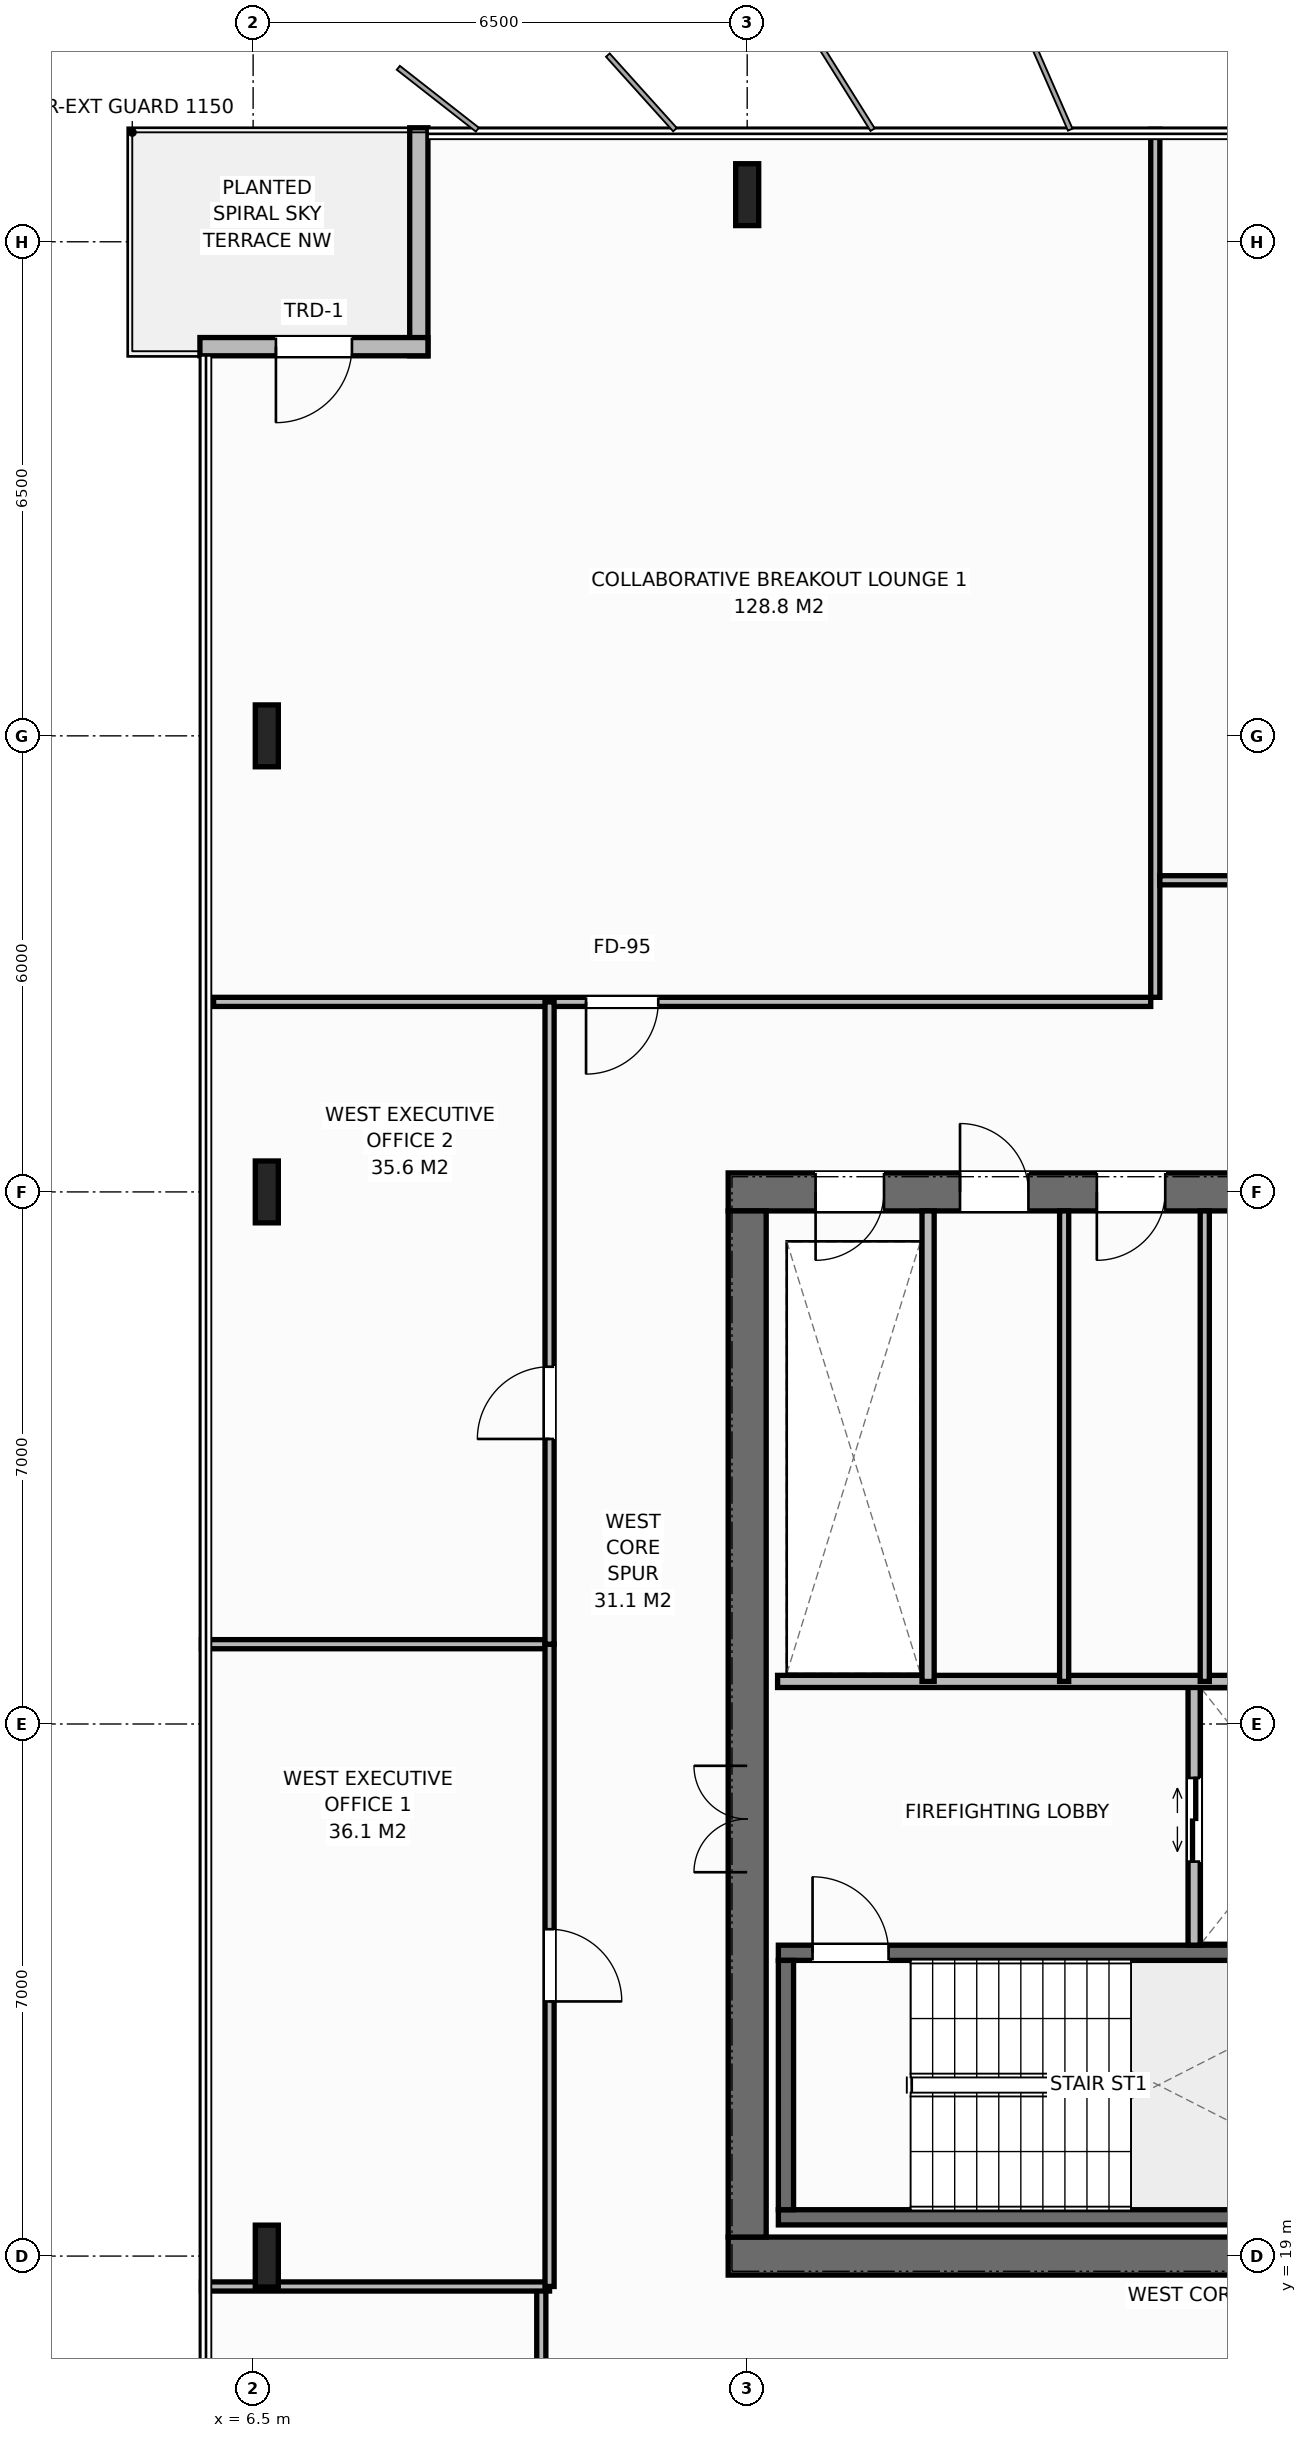
"""IFC4 building model, lengths in metres.
Left out: names, types, materials, properties, quantities, classifications, styles, units other than length and angle.
Written with IfcOpenShell. Run it as: python <this file> out.ifc"""

import sys

from ifc_helpers import new_model, si_unit, direction, frame, frame_2d, origin, origin_2d, place, context, subcontext, project, spatial, rectangle, i_section, extrude, element, fill, save


model = new_model("IFC4")
c1 = context("Model", 3, precision=1e-05, world=origin(), true_north=direction((0.0, 1.0)))
c2 = subcontext(c1, "Body", "Model", "MODEL_VIEW")
j1 = project(units=[si_unit("LENGTHUNIT", "METRE"), si_unit("PLANEANGLEUNIT", "RADIAN")], contexts=[c1])
p1 = place(None, origin())
s1 = spatial("IfcSite", under=j1, at=p1, CompositionType="ELEMENT")
p2 = place(p1, origin())
s2 = spatial("IfcBuilding", under=s1, at=p2, CompositionType="ELEMENT")
p3 = place(p2, frame((0.0, 0.0, 221.4)))
s3 = spatial("IfcBuildingStorey", under=s2, at=p3, CompositionType="ELEMENT", Elevation=221.4)
p4 = place(p3, frame((12.75, 19.0, 0.0), z_axis=(0.0, 0.0, 1.0), x_axis=(1.0, 0.0, 0.0)))
e1 = element("IfcWall", 1, at=p4, inside=s3, PredefinedType="SHEAR", context=c2, shape_type="SweptSolid", body=[
    extrude(rectangle(XDim=13.5, YDim=0.5, at=frame_2d((6.75, 0.0))), origin(), (0.0, 0.0, 1.0), 3.8),
])
p5 = place(p4, frame((9.13, 0.0, 0.0)))
e2 = element("IfcOpeningElement", 2, at=p5, cuts=e1, PredefinedType="OPENING", context=c2, shape_type="SweptSolid", body=[
    extrude(rectangle(XDim=1.4, YDim=2.2, at=frame_2d((0.7, 1.1))), frame((0.0, 0.26, 0.0), z_axis=(0.0, -1.0, 0.0), x_axis=(1.0, 0.0, 0.0)), (0.0, 0.0, 1.0), 0.52),
])
p6 = place(p3, frame((12.75, 33.0, 0.0), z_axis=(0.0, 0.0, 1.0), x_axis=(1.0, 0.0, 0.0)))
e3 = element("IfcWall", 3, at=p6, inside=s3, PredefinedType="SHEAR", context=c2, shape_type="SweptSolid", body=[
    extrude(rectangle(XDim=13.5, YDim=0.5, at=frame_2d((6.75, 0.0))), origin(), (0.0, 0.0, 1.0), 3.8),
])
p7 = place(p6, frame((1.15, 0.0, 0.0)))
e4 = element("IfcOpeningElement", 4, at=p7, cuts=e3, PredefinedType="OPENING", context=c2, shape_type="SweptSolid", body=[
    extrude(rectangle(XDim=0.9, YDim=2.15, at=frame_2d((0.45, 1.075))), frame((0.0, 0.26, 0.0), z_axis=(0.0, -1.0, 0.0), x_axis=(1.0, 0.0, 0.0)), (0.0, 0.0, 1.0), 0.52),
])
p8 = place(p6, frame((3.05, 0.0, 0.0)))
e5 = element("IfcOpeningElement", 5, at=p8, cuts=e3, PredefinedType="OPENING", context=c2, shape_type="SweptSolid", body=[
    extrude(rectangle(XDim=0.9, YDim=2.15, at=frame_2d((0.45, 1.075))), frame((0.0, 0.26, 0.0), z_axis=(0.0, -1.0, 0.0), x_axis=(1.0, 0.0, 0.0)), (0.0, 0.0, 1.0), 0.52),
])
p9 = place(p6, frame((4.85, 0.0, 0.0)))
e6 = element("IfcOpeningElement", 6, at=p9, cuts=e3, PredefinedType="OPENING", context=c2, shape_type="SweptSolid", body=[
    extrude(rectangle(XDim=0.9, YDim=2.15, at=frame_2d((0.45, 1.075))), frame((0.0, 0.26, 0.0), z_axis=(0.0, -1.0, 0.0), x_axis=(1.0, 0.0, 0.0)), (0.0, 0.0, 1.0), 0.52),
])
p10 = place(p6, frame((6.75, 0.0, 0.0)))
e7 = element("IfcOpeningElement", 7, at=p10, cuts=e3, PredefinedType="OPENING", context=c2, shape_type="SweptSolid", body=[
    extrude(rectangle(XDim=0.9, YDim=2.15, at=frame_2d((0.45, 1.075))), frame((0.0, 0.26, 0.0), z_axis=(0.0, -1.0, 0.0), x_axis=(1.0, 0.0, 0.0)), (0.0, 0.0, 1.0), 0.52),
])
p11 = place(p6, frame((9.13, 0.0, 0.0)))
e8 = element("IfcOpeningElement", 8, at=p11, cuts=e3, PredefinedType="OPENING", context=c2, shape_type="SweptSolid", body=[
    extrude(rectangle(XDim=1.4, YDim=2.2, at=frame_2d((0.7, 1.1))), frame((0.0, 0.26, 0.0), z_axis=(0.0, -1.0, 0.0), x_axis=(1.0, 0.0, 0.0)), (0.0, 0.0, 1.0), 0.52),
])
p12 = place(p3, frame((13.0, 19.25, 0.0), z_axis=(0.0, 0.0, 1.0), x_axis=(0.0, 1.0, 0.0)))
e9 = element("IfcWall", 9, at=p12, inside=s3, PredefinedType="SHEAR", context=c2, shape_type="SweptSolid", body=[
    extrude(rectangle(XDim=13.5, YDim=0.5, at=frame_2d((6.75, 0.0))), origin(), (0.0, 0.0, 1.0), 3.8),
])
p13 = place(p12, frame((4.8, 0.0, 0.0)))
e10 = element("IfcOpeningElement", 10, at=p13, cuts=e9, PredefinedType="OPENING", context=c2, shape_type="SweptSolid", body=[
    extrude(rectangle(XDim=1.4, YDim=2.2, at=frame_2d((0.7, 1.1))), frame((0.0, 0.26, 0.0), z_axis=(0.0, -1.0, 0.0), x_axis=(1.0, 0.0, 0.0)), (0.0, 0.0, 1.0), 0.52),
])
p14 = place(p3, frame((13.41, 19.51, 0.0), z_axis=(0.0, 0.0, 1.0), x_axis=(1.0, 0.0, 0.0)))
e11 = element("IfcWall", 11, at=p14, inside=s3, PredefinedType="SHEAR", context=c2, shape_type="SweptSolid", body=[
    extrude(rectangle(XDim=8.43, YDim=0.2, at=frame_2d((4.215, 0.0))), origin(), (0.0, 0.0, 1.0), 3.8),
])
p15 = place(p3, frame((13.41, 22.99, 0.0), z_axis=(0.0, 0.0, 1.0), x_axis=(1.0, 0.0, 0.0)))
e12 = element("IfcWall", 12, at=p15, inside=s3, PredefinedType="SHEAR", context=c2, shape_type="SweptSolid", body=[
    extrude(rectangle(XDim=8.43, YDim=0.2, at=frame_2d((4.215, 0.0))), origin(), (0.0, 0.0, 1.0), 3.8),
])
p16 = place(p15, frame((0.45, 0.0, 0.0)))
e13 = element("IfcOpeningElement", 13, at=p16, cuts=e12, PredefinedType="OPENING", context=c2, shape_type="SweptSolid", body=[
    extrude(rectangle(XDim=1.0, YDim=2.15, at=frame_2d((0.5, 1.075))), frame((0.0, 0.11, 0.0), z_axis=(0.0, -1.0, 0.0), x_axis=(1.0, 0.0, 0.0)), (0.0, 0.0, 1.0), 0.22),
])
p17 = place(p3, frame((13.51, 19.61, 0.0), z_axis=(0.0, 0.0, 1.0), x_axis=(0.0, 1.0, 0.0)))
e14 = element("IfcWall", 14, at=p17, inside=s3, PredefinedType="SHEAR", context=c2, shape_type="SweptSolid", body=[
    extrude(rectangle(XDim=3.28, YDim=0.2, at=frame_2d((1.64, 0.0))), origin(), (0.0, 0.0, 1.0), 3.8),
])
for number, where, z_axis, x_axis in (
    (15, (13.0, 46.12, 0.0), (0.0, 0.0, 1.0), (1.0, 0.0, 0.0)),
    (16, (6.68, 19.0, 0.0), (0.0, 0.0, 1.0), (1.0, 0.0, 0.0)),
    (17, (6.68, 33.0, 0.0), (0.0, 0.0, 1.0), (1.0, 0.0, 0.0)),
    (18, (6.68, 39.0, 0.0), (0.0, 0.0, 1.0), (1.0, 0.0, 0.0)),
):
    element("IfcColumn", number, at=place(p3, frame(where, z_axis=z_axis, x_axis=x_axis)), inside=s3, PredefinedType="COLUMN", context=c2, shape_type="SweptSolid", body=[
        extrude(i_section(OverallWidth=0.303, OverallDepth=0.814, WebThickness=0.021, FlangeThickness=0.04, at=origin_2d()), origin(), (0.0, 0.0, 1.0), 3.8),
    ])
p18 = place(p3, frame((8.68, 44.0, 0.0), z_axis=(0.0, 0.0, 1.0), x_axis=(0.0, 1.0, 0.0)))
e19 = element("IfcWall", 19, at=p18, inside=s3, PredefinedType="STANDARD", context=c2, shape_type="SweptSolid", body=[
    extrude(rectangle(XDim=3.0, YDim=0.24, at=frame_2d((1.5, 0.0))), origin(), (0.0, 0.0, 1.0), 3.58),
])
p19 = place(p3, frame((5.8, 44.12, 0.0), z_axis=(0.0, 0.0, 1.0), x_axis=(1.0, 0.0, 0.0)))
e20 = element("IfcWall", 20, at=p19, inside=s3, PredefinedType="STANDARD", context=c2, shape_type="SweptSolid", body=[
    extrude(rectangle(XDim=3.0, YDim=0.24, at=frame_2d((1.5, 0.0))), origin(), (0.0, 0.0, 1.0), 3.58),
])
p20 = place(p19, frame((1.0, 0.0, 0.0)))
e21 = element("IfcOpeningElement", 21, at=p20, cuts=e20, PredefinedType="OPENING", context=c2, shape_type="SweptSolid", body=[
    extrude(rectangle(XDim=1.0, YDim=2.2, at=frame_2d((0.5, 1.1))), frame((0.0, 0.13, 0.0), z_axis=(0.0, -1.0, 0.0), x_axis=(1.0, 0.0, 0.0)), (0.0, 0.0, 1.0), 0.26),
])
p21 = place(p3, frame((18.88, 23.09, 0.0), z_axis=(0.0, 0.0, 1.0), x_axis=(0.0, 1.0, 0.0)))
e22 = element("IfcWall", 22, at=p21, inside=s3, PredefinedType="STANDARD", context=c2, shape_type="SweptSolid", body=[
    extrude(rectangle(XDim=3.47, YDim=0.16, at=frame_2d((1.735, 0.0))), origin(), (0.0, 0.0, 1.0), 3.58),
])
p22 = place(p21, frame((1.1, 0.0, 0.0)))
e23 = element("IfcOpeningElement", 23, at=p22, cuts=e22, PredefinedType="OPENING", context=c2, shape_type="SweptSolid", body=[
    extrude(rectangle(XDim=1.1, YDim=2.2, at=frame_2d((0.55, 1.1))), frame((0.0, 0.09, 0.0), z_axis=(0.0, -1.0, 0.0), x_axis=(1.0, 0.0, 0.0)), (0.0, 0.0, 1.0), 0.18),
])
p23 = place(p3, frame((13.4, 26.56, 0.0), z_axis=(0.0, 0.0, 1.0), x_axis=(1.0, 0.0, 0.0)))
e24 = element("IfcWall", 24, at=p23, inside=s3, PredefinedType="STANDARD", context=c2, shape_type="SweptSolid", body=[
    extrude(rectangle(XDim=8.34, YDim=0.16, at=frame_2d((4.17, 0.0))), origin(), (0.0, 0.0, 1.0), 3.58),
])
p24 = place(p3, frame((15.38, 26.56, 0.0), z_axis=(0.0, 0.0, 1.0), x_axis=(0.0, 1.0, 0.0)))
e25 = element("IfcWall", 25, at=p24, inside=s3, PredefinedType="STANDARD", context=c2, shape_type="SweptSolid", body=[
    extrude(rectangle(XDim=6.19, YDim=0.16, at=frame_2d((3.095, 0.0))), origin(), (0.0, 0.0, 1.0), 3.58),
])
for number, where, z_axis, x_axis in (
    (26, (17.17, 26.56, 0.0), (0.0, 0.0, 1.0), (0.0, 1.0, 0.0)),
    (27, (19.02, 26.56, 0.0), (0.0, 0.0, 1.0), (0.0, 1.0, 0.0)),
):
    element("IfcWall", number, at=place(p3, frame(where, z_axis=z_axis, x_axis=x_axis)), inside=s3, PredefinedType="PARTITIONING", context=c2, shape_type="SweptSolid", body=[
        extrude(rectangle(XDim=6.19, YDim=0.12, at=frame_2d((3.095, 0.0))), origin(), (0.0, 0.0, 1.0), 3.58),
    ])
p25 = place(p3, frame((10.291, 16.5, 0.0), z_axis=(0.0, 0.0, 1.0), x_axis=(0.0, 1.0, 0.0)))
e28 = element("IfcWall", 28, at=p25, inside=s3, PredefinedType="PARTITIONING", context=c2, shape_type="SweptSolid", body=[
    extrude(rectangle(XDim=2.1, YDim=0.12, at=frame_2d((1.05, 0.0))), origin(), (0.0, 0.0, 1.0), 3.58),
])
p26 = place(p3, frame((18.369, 35.56, 0.0), z_axis=(0.0, 0.0, 1.0), x_axis=(0.0, 1.0, 0.0)))
e29 = element("IfcWall", 29, at=p26, inside=s3, PredefinedType="PARTITIONING", context=c2, shape_type="SweptSolid", body=[
    extrude(rectangle(XDim=11.42, YDim=0.12, at=frame_2d((5.71, 0.0))), origin(), (0.0, 0.0, 1.0), 3.58),
])
p27 = place(p3, frame((5.98, 35.5, 0.0), z_axis=(0.0, 0.0, 1.0), x_axis=(1.0, 0.0, 0.0)))
e30 = element("IfcWall", 30, at=p27, inside=s3, PredefinedType="PARTITIONING", context=c2, shape_type="SweptSolid", body=[
    extrude(rectangle(XDim=12.329, YDim=0.12, at=frame_2d((6.165, 0.0))), origin(), (0.0, 0.0, 1.0), 3.58),
])
p28 = place(p27, frame((4.9, 0.0, 0.0)))
e31 = element("IfcOpeningElement", 31, at=p28, cuts=e30, PredefinedType="OPENING", context=c2, shape_type="SweptSolid", body=[
    extrude(rectangle(XDim=0.95, YDim=2.15, at=frame_2d((0.475, 1.075))), frame((0.0, 0.07, 0.0), z_axis=(0.0, -1.0, 0.0), x_axis=(1.0, 0.0, 0.0)), (0.0, 0.0, 1.0), 0.14),
])
p29 = place(p3, frame((18.429, 37.1, 0.0), z_axis=(0.0, 0.0, 1.0), x_axis=(1.0, 0.0, 0.0)))
e32 = element("IfcWall", 32, at=p29, inside=s3, PredefinedType="PARTITIONING", context=c2, shape_type="SweptSolid", body=[
    extrude(rectangle(XDim=8.954, YDim=0.12, at=frame_2d((4.477, 0.0))), origin(), (0.0, 0.0, 1.0), 3.58),
])
p30 = place(p29, frame((4.002, 0.0, 0.0)))
e33 = element("IfcOpeningElement", 33, at=p30, cuts=e32, PredefinedType="OPENING", context=c2, shape_type="SweptSolid", body=[
    extrude(rectangle(XDim=0.95, YDim=2.15, at=frame_2d((0.475, 1.075))), frame((0.0, 0.07, 0.0), z_axis=(0.0, -1.0, 0.0), x_axis=(1.0, 0.0, 0.0)), (0.0, 0.0, 1.0), 0.14),
])
for number, where, z_axis, x_axis in (
    (34, (5.82, 18.6, 0.0), (0.0, 0.0, 1.0), (1.0, 0.0, 0.0)),
    (35, (5.82, 27.05, 0.0), (0.0, 0.0, 1.0), (1.0, 0.0, 0.0)),
):
    element("IfcWall", number, at=place(p3, frame(where, z_axis=z_axis, x_axis=x_axis)), inside=s3, PredefinedType="PARTITIONING", context=c2, shape_type="SweptSolid", body=[
        extrude(rectangle(XDim=4.58, YDim=0.12, at=frame_2d((2.29, 0.0))), origin(), (0.0, 0.0, 1.0), 3.58),
    ])
p31 = place(p3, frame((10.4, 18.6, 0.0), z_axis=(0.0, 0.0, 1.0), x_axis=(0.0, 1.0, 0.0)))
e36 = element("IfcWall", 36, at=p31, inside=s3, PredefinedType="PARTITIONING", context=c2, shape_type="SweptSolid", body=[
    extrude(rectangle(XDim=8.45, YDim=0.12, at=frame_2d((4.225, 0.0))), origin(), (0.0, 0.0, 1.0), 3.58),
])
p32 = place(p31, frame((3.75, 0.0, 0.0)))
e37 = element("IfcOpeningElement", 37, at=p32, cuts=e36, PredefinedType="OPENING", context=c2, shape_type="SweptSolid", body=[
    extrude(rectangle(XDim=0.95, YDim=2.15, at=frame_2d((0.475, 1.075))), frame((0.0, 0.07, 0.0), z_axis=(0.0, -1.0, 0.0), x_axis=(1.0, 0.0, 0.0)), (0.0, 0.0, 1.0), 0.14),
])
p33 = place(p3, frame((10.4, 27.05, 0.0), z_axis=(0.0, 0.0, 1.0), x_axis=(0.0, 1.0, 0.0)))
e38 = element("IfcWall", 38, at=p33, inside=s3, PredefinedType="PARTITIONING", context=c2, shape_type="SweptSolid", body=[
    extrude(rectangle(XDim=8.45, YDim=0.12, at=frame_2d((4.225, 0.0))), origin(), (0.0, 0.0, 1.0), 3.58),
])
p34 = place(p33, frame((2.7, 0.0, 0.0)))
e39 = element("IfcOpeningElement", 39, at=p34, cuts=e38, PredefinedType="OPENING", context=c2, shape_type="SweptSolid", body=[
    extrude(rectangle(XDim=0.95, YDim=2.15, at=frame_2d((0.475, 1.075))), frame((0.0, 0.07, 0.0), z_axis=(0.0, -1.0, 0.0), x_axis=(1.0, 0.0, 0.0)), (0.0, 0.0, 1.0), 0.14),
])
p35 = place(p20, origin())
e40 = element("IfcDoor", 40, at=p35, inside=s3, OperationType="SINGLE_SWING_RIGHT", PredefinedType="DOOR", context=c2, shape_type="SweptSolid", body=[
    extrude(rectangle(XDim=1.0, YDim=2.2, at=frame_2d((0.5, 1.1))), frame((0.0, 0.025, 0.0), z_axis=(0.0, -1.0, 0.0), x_axis=(1.0, 0.0, 0.0)), (0.0, 0.0, 1.0), 0.05),
])
fill(e21, e40)
p36 = place(p16, origin())
e41 = element("IfcDoor", 41, at=p36, inside=s3, OperationType="SINGLE_SWING_LEFT", PredefinedType="DOOR", context=c2, shape_type="SweptSolid", body=[
    extrude(rectangle(XDim=1.0, YDim=2.15, at=frame_2d((0.5, 1.075))), frame((0.0, 0.025, 0.0), z_axis=(0.0, -1.0, 0.0), x_axis=(1.0, 0.0, 0.0)), (0.0, 0.0, 1.0), 0.05),
])
fill(e13, e41)
p37 = place(p13, origin())
e42 = element("IfcDoor", 42, at=p37, inside=s3, OperationType="DOUBLE_DOOR_SINGLE_SWING", PredefinedType="DOOR", context=c2, shape_type="SweptSolid", body=[
    extrude(rectangle(XDim=1.4, YDim=2.2, at=frame_2d((0.7, 1.1))), frame((0.0, 0.025, 0.0), z_axis=(0.0, -1.0, 0.0), x_axis=(1.0, 0.0, 0.0)), (0.0, 0.0, 1.0), 0.05),
])
fill(e10, e42)
p38 = place(p22, origin())
e43 = element("IfcDoor", 43, at=p38, inside=s3, OperationType="DOUBLE_DOOR_SLIDING", PredefinedType="DOOR", context=c2, shape_type="SweptSolid", body=[
    extrude(rectangle(XDim=1.1, YDim=2.2, at=frame_2d((0.55, 1.1))), frame((0.0, 0.025, 0.0), z_axis=(0.0, -1.0, 0.0), x_axis=(1.0, 0.0, 0.0)), (0.0, 0.0, 1.0), 0.05),
])
fill(e23, e43)
p39 = place(p7, origin())
e44 = element("IfcDoor", 44, at=p39, inside=s3, OperationType="SINGLE_SWING_RIGHT", PredefinedType="DOOR", context=c2, shape_type="SweptSolid", body=[
    extrude(rectangle(XDim=0.9, YDim=2.15, at=frame_2d((0.45, 1.075))), frame((0.0, -0.025, 0.0), z_axis=(0.0, -1.0, 0.0), x_axis=(1.0, 0.0, 0.0)), (0.0, 0.0, 1.0), 0.05),
])
fill(e4, e44)
p40 = place(p8, origin())
e45 = element("IfcDoor", 45, at=p40, inside=s3, OperationType="SINGLE_SWING_LEFT", PredefinedType="DOOR", context=c2, shape_type="SweptSolid", body=[
    extrude(rectangle(XDim=0.9, YDim=2.15, at=frame_2d((0.45, 1.075))), frame((0.0, -0.025, 0.0), z_axis=(0.0, -1.0, 0.0), x_axis=(1.0, 0.0, 0.0)), (0.0, 0.0, 1.0), 0.05),
])
fill(e5, e45)
p41 = place(p9, origin())
e46 = element("IfcDoor", 46, at=p41, inside=s3, OperationType="SINGLE_SWING_RIGHT", PredefinedType="DOOR", context=c2, shape_type="SweptSolid", body=[
    extrude(rectangle(XDim=0.9, YDim=2.15, at=frame_2d((0.45, 1.075))), frame((0.0, -0.025, 0.0), z_axis=(0.0, -1.0, 0.0), x_axis=(1.0, 0.0, 0.0)), (0.0, 0.0, 1.0), 0.05),
])
fill(e6, e46)
p42 = place(p28, origin())
e47 = element("IfcDoor", 47, at=p42, inside=s3, OperationType="SINGLE_SWING_RIGHT", PredefinedType="DOOR", context=c2, shape_type="SweptSolid", body=[
    extrude(rectangle(XDim=0.95, YDim=2.15, at=frame_2d((0.475, 1.075))), frame((0.0, 0.025, 0.0), z_axis=(0.0, -1.0, 0.0), x_axis=(1.0, 0.0, 0.0)), (0.0, 0.0, 1.0), 0.05),
])
fill(e31, e47)
p43 = place(p32, origin())
e48 = element("IfcDoor", 48, at=p43, inside=s3, OperationType="SINGLE_SWING_RIGHT", PredefinedType="DOOR", context=c2, shape_type="SweptSolid", body=[
    extrude(rectangle(XDim=0.95, YDim=2.15, at=frame_2d((0.475, 1.075))), frame((0.0, 0.025, 0.0), z_axis=(0.0, -1.0, 0.0), x_axis=(1.0, 0.0, 0.0)), (0.0, 0.0, 1.0), 0.05),
])
fill(e37, e48)
p44 = place(p34, origin())
e49 = element("IfcDoor", 49, at=p44, inside=s3, OperationType="SINGLE_SWING_LEFT", PredefinedType="DOOR", context=c2, shape_type="SweptSolid", body=[
    extrude(rectangle(XDim=0.95, YDim=2.15, at=frame_2d((0.475, 1.075))), frame((0.0, 0.025, 0.0), z_axis=(0.0, -1.0, 0.0), x_axis=(1.0, 0.0, 0.0)), (0.0, 0.0, 1.0), 0.05),
])
fill(e39, e49)
save(model, sys.argv[1])
